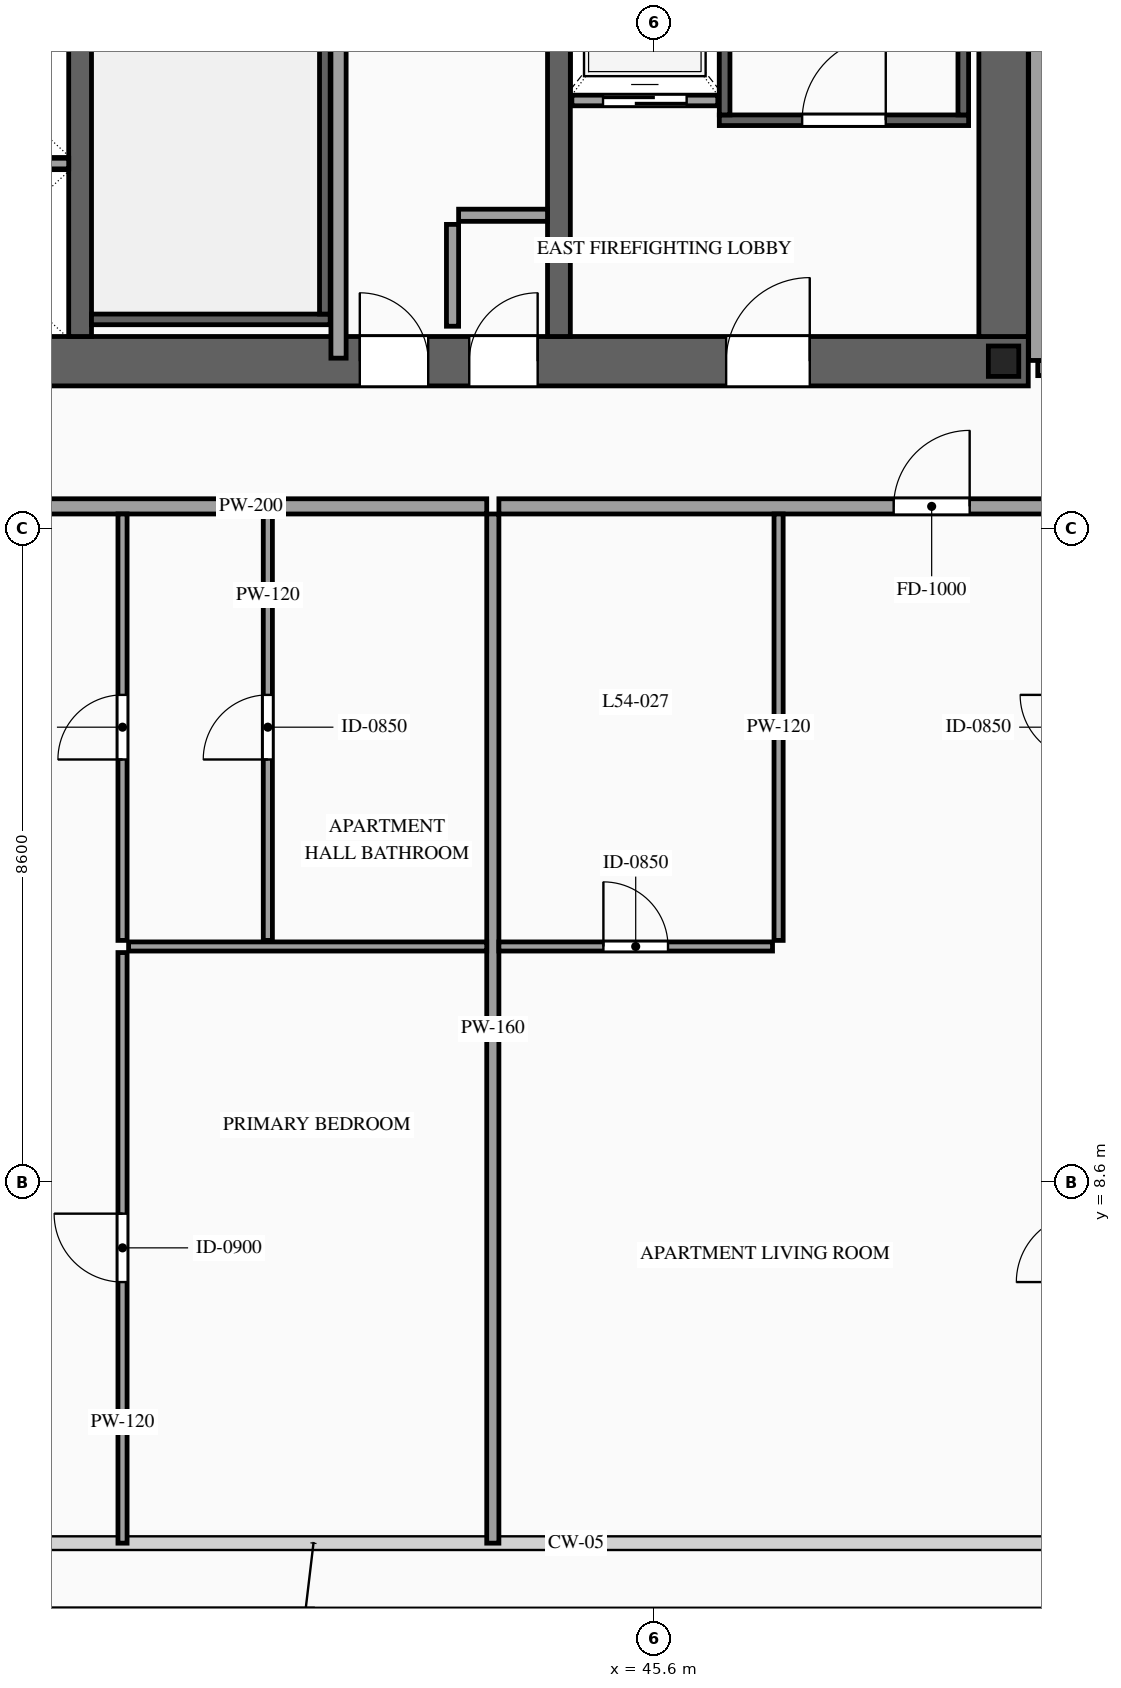
"""IFC4 building model, lengths in metres.
Left out: names, types, materials, properties, quantities, classifications, styles, units other than length and angle.
Written with IfcOpenShell. Run it as: python <this file> out.ifc"""

import sys

from ifc_helpers import new_model, si_unit, direction, frame, frame_2d, origin, origin_2d, place, context, subcontext, project, spatial, rectangle, i_section, extrude, source, transform, mapped, element, fill, save


model = new_model("IFC4")
c1 = context("Model", 3, precision=1e-05, world=origin(), true_north=direction((0.0, 1.0)))
c2 = subcontext(c1, "Body", "Model", "MODEL_VIEW")
j1 = project(units=[si_unit("LENGTHUNIT", "METRE"), si_unit("PLANEANGLEUNIT", "RADIAN")], contexts=[c1])
p1 = place(None, origin())
s1 = spatial("IfcSite", under=j1, at=p1, CompositionType="ELEMENT")
p2 = place(p1, origin())
s2 = spatial("IfcBuilding", under=s1, at=p2, CompositionType="ELEMENT")
p3 = place(p2, frame((0.0, 0.0, 205.5)))
s3 = spatial("IfcBuildingStorey", under=s2, at=p3, CompositionType="ELEMENT", Elevation=205.5)
p4 = place(p3, frame((23.475, 19.4, 0.0), z_axis=(0.0, 0.0, 1.0), x_axis=(1.0, 0.0, 0.0)))
e1 = element("IfcWall", 1, at=p4, inside=s3, PredefinedType="SHEAR", context=c2, shape_type="SweptSolid", body=[
    extrude(rectangle(XDim=27.05, YDim=0.65, at=frame_2d((13.525, 0.0))), origin(), (0.0, 0.0, 1.0), 3.5),
])
p5 = place(p4, frame((1.975, 0.0, 0.0)))
e2 = element("IfcOpeningElement", 2, at=p5, cuts=e1, PredefinedType="OPENING", context=c2, shape_type="SweptSolid", body=[
    extrude(rectangle(XDim=1.1, YDim=2.2, at=frame_2d((0.55, 1.1))), frame((0.0, 0.34, 0.0), z_axis=(0.0, -1.0, 0.0), x_axis=(1.0, 0.0, 0.0)), (0.0, 0.0, 1.0), 0.68),
])
p6 = place(p4, frame((9.875, 0.0, 0.0)))
e3 = element("IfcOpeningElement", 3, at=p6, cuts=e1, PredefinedType="OPENING", context=c2, shape_type="SweptSolid", body=[
    extrude(rectangle(XDim=1.1, YDim=2.2, at=frame_2d((0.55, 1.1))), frame((0.0, 0.34, 0.0), z_axis=(0.0, -1.0, 0.0), x_axis=(1.0, 0.0, 0.0)), (0.0, 0.0, 1.0), 0.68),
])
p7 = place(p4, frame((23.075, 0.0, 0.0)))
e4 = element("IfcOpeningElement", 4, at=p7, cuts=e1, PredefinedType="OPENING", context=c2, shape_type="SweptSolid", body=[
    extrude(rectangle(XDim=1.1, YDim=2.2, at=frame_2d((0.55, 1.1))), frame((0.0, 0.34, 0.0), z_axis=(0.0, -1.0, 0.0), x_axis=(1.0, 0.0, 0.0)), (0.0, 0.0, 1.0), 0.68),
])
p8 = place(p4, frame((19.695, 0.0, 0.0)))
e5 = element("IfcOpeningElement", 5, at=p8, cuts=e1, PredefinedType="OPENING", context=c2, shape_type="SweptSolid", body=[
    extrude(rectangle(XDim=0.9, YDim=2.15, at=frame_2d((0.45, 1.075))), frame((0.0, 0.34, 0.0), z_axis=(0.0, -1.0, 0.0), x_axis=(1.0, 0.0, 0.0)), (0.0, 0.0, 1.0), 0.68),
])
p9 = place(p4, frame((18.255, 0.0, 0.0)))
e6 = element("IfcOpeningElement", 6, at=p9, cuts=e1, PredefinedType="OPENING", context=c2, shape_type="SweptSolid", body=[
    extrude(rectangle(XDim=0.9, YDim=2.15, at=frame_2d((0.45, 1.075))), frame((0.0, 0.34, 0.0), z_axis=(0.0, -1.0, 0.0), x_axis=(1.0, 0.0, 0.0)), (0.0, 0.0, 1.0), 0.68),
])
m1 = source(origin(), c2, "Body", "SweptSolid", [
    extrude(rectangle(XDim=12.15, YDim=0.65, at=frame_2d((6.075, 0.0))), origin(), (0.0, 0.0, 1.0), 3.5),
])
p10 = place(p3, frame((50.2, 19.725, 0.0), z_axis=(0.0, 0.0, 1.0), x_axis=(0.0, 1.0, 0.0)))
e7 = element("IfcWall", 7, at=p10, inside=s3, PredefinedType="SHEAR", context=c2, shape_type="MappedRepresentation", body=[
    mapped(m1, transform((0.0, 0.0, 0.0), scale=1.0)),
])
m2 = source(origin(), c2, "Body", "SweptSolid", [
    extrude(rectangle(XDim=12.15, YDim=0.3, at=frame_2d((6.075, 0.0))), origin(), (0.0, 0.0, 1.0), 3.5),
])
for number, where, z_axis, x_axis in (
    (8, (38.05, 19.725, 0.0), (0.0, 0.0, 1.0), (0.0, 1.0, 0.0)),
    (9, (44.35, 19.725, 0.0), (0.0, 0.0, 1.0), (0.0, 1.0, 0.0)),
):
    element("IfcWall", number, at=place(p3, frame(where, z_axis=z_axis, x_axis=x_axis)), inside=s3, PredefinedType="SOLIDWALL", context=c2, shape_type="MappedRepresentation", body=[
        mapped(m2, transform((0.0, 0.0, 0.0), scale=1.0)),
    ])
m3 = source(origin(), c2, "Body", "SweptSolid", [
    extrude(i_section(OverallWidth=0.4, OverallDepth=0.4, WebThickness=0.013, FlangeThickness=0.021, at=origin_2d()), origin(), (0.0, 0.0, 1.0), 3.5),
])
p11 = place(p3, frame((50.2, 19.4, 0.0), z_axis=(0.0, 0.0, 1.0), x_axis=(1.0, 0.0, 0.0)))
e10 = element("IfcColumn", 10, at=p11, inside=s3, PredefinedType="COLUMN", context=c2, shape_type="MappedRepresentation", body=[
    mapped(m3, transform((0.0, 0.0, 0.0), scale=1.0)),
])
p12 = place(p3, frame((44.52, 22.83, 0.0), z_axis=(0.0, 0.0, 1.0), x_axis=(1.0, 0.0, 0.0)))
e11 = element("IfcWall", 11, at=p12, inside=s3, PredefinedType="SOLIDWALL", context=c2, shape_type="SweptSolid", body=[
    extrude(rectangle(XDim=1.92, YDim=0.14, at=frame_2d((0.96, 0.0))), origin(), (0.0, 0.0, 1.0), 3.28),
])
p13 = place(p12, frame((0.41, 0.0, 0.0)))
e12 = element("IfcOpeningElement", 12, at=p13, cuts=e11, PredefinedType="OPENING", context=c2, shape_type="SweptSolid", body=[
    extrude(rectangle(XDim=1.1, YDim=2.2, at=frame_2d((0.55, 1.1))), frame((0.0, 0.085, 0.0), z_axis=(0.0, -1.0, 0.0), x_axis=(1.0, 0.0, 0.0)), (0.0, 0.0, 1.0), 0.17),
])
m4 = source(origin(), c2, "Body", "SweptSolid", [
    extrude(rectangle(XDim=2.4, YDim=0.14, at=frame_2d((1.2, 0.0))), origin(), (0.0, 0.0, 1.0), 3.28),
])
p14 = place(p3, frame((35.5, 22.0, 0.0), z_axis=(0.0, 0.0, 1.0), x_axis=(1.0, 0.0, 0.0)))
e13 = element("IfcWall", 13, at=p14, inside=s3, PredefinedType="SOLIDWALL", context=c2, shape_type="MappedRepresentation", body=[
    mapped(m4, transform((0.0, 0.0, 0.0), scale=1.0)),
])
p15 = place(p3, frame((46.46, 22.57, 0.0), z_axis=(0.0, 0.0, 1.0), x_axis=(1.0, 0.0, 0.0)))
e14 = element("IfcWall", 14, at=p15, inside=s3, PredefinedType="SOLIDWALL", context=c2, shape_type="SweptSolid", body=[
    extrude(rectangle(XDim=3.28, YDim=0.14, at=frame_2d((1.64, 0.0))), origin(), (0.0, 0.0, 1.0), 3.28),
])
p16 = place(p15, frame((1.09, 0.0, 0.0)))
e15 = element("IfcOpeningElement", 15, at=p16, cuts=e14, PredefinedType="OPENING", context=c2, shape_type="SweptSolid", body=[
    extrude(rectangle(XDim=1.1, YDim=2.2, at=frame_2d((0.55, 1.1))), frame((0.0, 0.085, 0.0), z_axis=(0.0, -1.0, 0.0), x_axis=(1.0, 0.0, 0.0)), (0.0, 0.0, 1.0), 0.17),
])
m5 = source(origin(), c2, "Body", "SweptSolid", [
    extrude(rectangle(XDim=8.94, YDim=0.14, at=frame_2d((4.47, 0.0))), origin(), (0.0, 0.0, 1.0), 3.28),
])
for number, where, z_axis, x_axis in (
    (16, (46.53, 22.64, 0.0), (0.0, 0.0, 1.0), (0.0, 1.0, 0.0)),
    (17, (49.67, 22.64, 0.0), (0.0, 0.0, 1.0), (0.0, 1.0, 0.0)),
):
    element("IfcWall", number, at=place(p3, frame(where, z_axis=z_axis, x_axis=x_axis)), inside=s3, PredefinedType="SOLIDWALL", context=c2, shape_type="MappedRepresentation", body=[
        mapped(m5, transform((0.0, 0.0, 0.0), scale=1.0)),
    ])
m6 = source(origin(), c2, "Body", "SweptSolid", [
    extrude(rectangle(XDim=3.14, YDim=0.14, at=frame_2d((1.57, 0.0))), origin(), (0.0, 0.0, 1.0), 3.28),
])
p17 = place(p3, frame((38.2, 19.95, 0.0), z_axis=(0.0, 0.0, 1.0), x_axis=(1.0, 0.0, 0.0)))
e18 = element("IfcWall", 18, at=p17, inside=s3, PredefinedType="SOLIDWALL", context=c2, shape_type="MappedRepresentation", body=[
    mapped(m6, transform((0.0, 0.0, 0.0), scale=1.0)),
])
m7 = source(origin(), c2, "Body", "SweptSolid", [
    extrude(rectangle(XDim=8.94, YDim=0.14, at=frame_2d((4.47, 0.0))), origin(), (0.0, 0.0, 1.0), 3.28),
])
p18 = place(p3, frame((41.27, 20.02, 0.0), z_axis=(0.0, 0.0, 1.0), x_axis=(0.0, 1.0, 0.0)))
e19 = element("IfcWall", 19, at=p18, inside=s3, PredefinedType="SOLIDWALL", context=c2, shape_type="MappedRepresentation", body=[
    mapped(m7, transform((0.0, 0.0, 0.0), scale=1.0)),
])
m8 = source(origin(), c2, "Body", "SweptSolid", [
    extrude(rectangle(XDim=1.34, YDim=0.16, at=frame_2d((0.67, 0.0))), origin(), (0.0, 0.0, 1.0), 3.28),
])
p19 = place(p3, frame((42.95, 19.86, 0.0), z_axis=(0.0, 0.0, 1.0), x_axis=(0.0, 1.0, 0.0)))
e20 = element("IfcWall", 20, at=p19, inside=s3, PredefinedType="PARTITIONING", context=c2, shape_type="MappedRepresentation", body=[
    mapped(m8, transform((0.0, 0.0, 0.0), scale=1.0)),
])
m9 = source(origin(), c2, "Body", "SweptSolid", [
    extrude(rectangle(XDim=1.17, YDim=0.16, at=frame_2d((0.585, 0.0))), origin(), (0.0, 0.0, 1.0), 3.28),
])
p20 = place(p3, frame((43.03, 21.32, 0.0), z_axis=(0.0, 0.0, 1.0), x_axis=(1.0, 0.0, 0.0)))
e21 = element("IfcWall", 21, at=p20, inside=s3, PredefinedType="PARTITIONING", context=c2, shape_type="MappedRepresentation", body=[
    mapped(m9, transform((0.0, 0.0, 0.0), scale=1.0)),
])
m10 = source(origin(), c2, "Body", "SweptSolid", [
    extrude(rectangle(XDim=12.72, YDim=0.2, at=frame_2d((6.36, 0.0))), origin(), (0.0, 0.0, 1.0), 3.28),
])
p21 = place(p3, frame((41.45, 19.44, 0.0), z_axis=(0.0, 0.0, 1.0), x_axis=(0.0, 1.0, 0.0)))
e22 = element("IfcWall", 22, at=p21, inside=s3, PredefinedType="PARTITIONING", context=c2, shape_type="MappedRepresentation", body=[
    mapped(m10, transform((0.0, 0.0, 0.0), scale=1.0)),
])
p22 = place(p3, frame((30.6, 17.49, 0.0), z_axis=(0.0, 0.0, 1.0), x_axis=(1.0, 0.0, 0.0)))
e23 = element("IfcWall", 23, at=p22, inside=s3, PredefinedType="PARTITIONING", context=c2, shape_type="SweptSolid", body=[
    extrude(rectangle(XDim=12.8, YDim=0.2, at=frame_2d((6.4, 0.0))), origin(), (0.0, 0.0, 1.0), 3.28),
])
p23 = place(p22, frame((5.344, 0.0, 0.0)))
e24 = element("IfcOpeningElement", 24, at=p23, cuts=e23, PredefinedType="OPENING", context=c2, shape_type="SweptSolid", body=[
    extrude(rectangle(XDim=1.0, YDim=2.2, at=frame_2d((0.5, 1.1))), frame((0.0, 0.115, 0.0), z_axis=(0.0, -1.0, 0.0), x_axis=(1.0, 0.0, 0.0)), (0.0, 0.0, 1.0), 0.23),
])
m11 = source(origin(), c2, "Body", "SweptSolid", [
    extrude(rectangle(XDim=13.54, YDim=0.16, at=frame_2d((6.77, 0.0))), origin(), (0.0, 0.0, 1.0), 3.28),
])
p24 = place(p3, frame((43.48, 3.85, 0.0), z_axis=(0.0, 0.0, 1.0), x_axis=(0.0, 1.0, 0.0)))
e25 = element("IfcWall", 25, at=p24, inside=s3, PredefinedType="PARTITIONING", context=c2, shape_type="MappedRepresentation", body=[
    mapped(m11, transform((0.0, 0.0, 0.0), scale=1.0)),
])
p25 = place(p3, frame((40.52, 11.78, 0.0), z_axis=(0.0, 0.0, 1.0), x_axis=(0.0, 1.0, 0.0)))
e26 = element("IfcWall", 26, at=p25, inside=s3, PredefinedType="PARTITIONING", context=c2, shape_type="SweptSolid", body=[
    extrude(rectangle(XDim=5.61, YDim=0.12, at=frame_2d((2.805, 0.0))), origin(), (0.0, 0.0, 1.0), 3.28),
])
p26 = place(p25, frame((2.38, 0.0, 0.0)))
e27 = element("IfcOpeningElement", 27, at=p26, cuts=e26, PredefinedType="OPENING", context=c2, shape_type="SweptSolid", body=[
    extrude(rectangle(XDim=0.85, YDim=2.1, at=frame_2d((0.425, 1.05))), frame((0.0, 0.075, 0.0), z_axis=(0.0, -1.0, 0.0), x_axis=(1.0, 0.0, 0.0)), (0.0, 0.0, 1.0), 0.15),
])
m12 = source(origin(), c2, "Body", "SweptSolid", [
    extrude(rectangle(XDim=4.712, YDim=0.12, at=frame_2d((2.356, 0.0))), origin(), (0.0, 0.0, 1.0), 2.875),
])
p27 = place(p3, frame((38.688, 11.7, 0.0), z_axis=(0.0, 0.0, 1.0), x_axis=(1.0, 0.0, 0.0)))
e28 = element("IfcWall", 28, at=p27, inside=s3, PredefinedType="PARTITIONING", context=c2, shape_type="MappedRepresentation", body=[
    mapped(m12, transform((0.0, 0.0, 0.0), scale=1.0)),
])
p28 = place(p3, frame((38.608, 3.85, 0.0), z_axis=(0.0, 0.0, 1.0), x_axis=(0.0, 1.0, 0.0)))
e29 = element("IfcWall", 29, at=p28, inside=s3, PredefinedType="PARTITIONING", context=c2, shape_type="SweptSolid", body=[
    extrude(rectangle(XDim=7.77, YDim=0.12, at=frame_2d((3.885, 0.0))), origin(), (0.0, 0.0, 1.0), 3.28),
])
p29 = place(p28, frame((3.435, 0.0, 0.0)))
e30 = element("IfcOpeningElement", 30, at=p29, cuts=e29, PredefinedType="OPENING", context=c2, shape_type="SweptSolid", body=[
    extrude(rectangle(XDim=0.9, YDim=2.15, at=frame_2d((0.45, 1.075))), frame((0.0, 0.075, 0.0), z_axis=(0.0, -1.0, 0.0), x_axis=(1.0, 0.0, 0.0)), (0.0, 0.0, 1.0), 0.15),
])
p30 = place(p3, frame((38.608, 11.78, 0.0), z_axis=(0.0, 0.0, 1.0), x_axis=(0.0, 1.0, 0.0)))
e31 = element("IfcWall", 31, at=p30, inside=s3, PredefinedType="PARTITIONING", context=c2, shape_type="SweptSolid", body=[
    extrude(rectangle(XDim=5.61, YDim=0.12, at=frame_2d((2.805, 0.0))), origin(), (0.0, 0.0, 1.0), 3.28),
])
p31 = place(p30, frame((2.38, 0.0, 0.0)))
e32 = element("IfcOpeningElement", 32, at=p31, cuts=e31, PredefinedType="OPENING", context=c2, shape_type="SweptSolid", body=[
    extrude(rectangle(XDim=0.85, YDim=2.1, at=frame_2d((0.425, 1.05))), frame((0.0, 0.075, 0.0), z_axis=(0.0, -1.0, 0.0), x_axis=(1.0, 0.0, 0.0)), (0.0, 0.0, 1.0), 0.15),
])
p32 = place(p3, frame((43.56, 17.49, 0.0), z_axis=(0.0, 0.0, 1.0), x_axis=(1.0, 0.0, 0.0)))
e33 = element("IfcWall", 33, at=p32, inside=s3, PredefinedType="PARTITIONING", context=c2, shape_type="SweptSolid", body=[
    extrude(rectangle(XDim=12.5, YDim=0.2, at=frame_2d((6.25, 0.0))), origin(), (0.0, 0.0, 1.0), 3.28),
])
p33 = place(p32, frame((5.194, 0.0, 0.0)))
e34 = element("IfcOpeningElement", 34, at=p33, cuts=e33, PredefinedType="OPENING", context=c2, shape_type="SweptSolid", body=[
    extrude(rectangle(XDim=1.0, YDim=2.2, at=frame_2d((0.5, 1.1))), frame((0.0, 0.115, 0.0), z_axis=(0.0, -1.0, 0.0), x_axis=(1.0, 0.0, 0.0)), (0.0, 0.0, 1.0), 0.23),
])
p34 = place(p3, frame((43.56, 11.7, 0.0), z_axis=(0.0, 0.0, 1.0), x_axis=(1.0, 0.0, 0.0)))
e35 = element("IfcWall", 35, at=p34, inside=s3, PredefinedType="PARTITIONING", context=c2, shape_type="SweptSolid", body=[
    extrude(rectangle(XDim=3.6, YDim=0.12, at=frame_2d((1.8, 0.0))), origin(), (0.0, 0.0, 1.0), 2.875),
])
p35 = place(p34, frame((1.375, 0.0, 0.0)))
e36 = element("IfcOpeningElement", 36, at=p35, cuts=e35, PredefinedType="OPENING", context=c2, shape_type="SweptSolid", body=[
    extrude(rectangle(XDim=0.85, YDim=2.1, at=frame_2d((0.425, 1.05))), frame((0.0, 0.075, 0.0), z_axis=(0.0, -1.0, 0.0), x_axis=(1.0, 0.0, 0.0)), (0.0, 0.0, 1.0), 0.15),
])
m13 = source(origin(), c2, "Body", "SweptSolid", [
    extrude(rectangle(XDim=5.61, YDim=0.12, at=frame_2d((2.805, 0.0))), origin(), (0.0, 0.0, 1.0), 3.28),
])
p36 = place(p3, frame((47.24, 11.78, 0.0), z_axis=(0.0, 0.0, 1.0), x_axis=(0.0, 1.0, 0.0)))
e37 = element("IfcWall", 37, at=p36, inside=s3, PredefinedType="PARTITIONING", context=c2, shape_type="MappedRepresentation", body=[
    mapped(m13, transform((0.0, 0.0, 0.0), scale=1.0)),
])
p37 = place(p3, frame((50.65, 19.31, 0.0), z_axis=(0.0, 0.0, 1.0), x_axis=(1.0, 0.0, 0.0)))
e38 = element("IfcWall", 38, at=p37, inside=s3, PredefinedType="PARTITIONING", context=c2, shape_type="SweptSolid", body=[
    extrude(rectangle(XDim=8.3, YDim=0.2, at=frame_2d((4.15, 0.0))), origin(), (0.0, 0.0, 1.0), 2.775),
])
p38 = place(p37, frame((3.585, 0.0, 0.0)))
e39 = element("IfcOpeningElement", 39, at=p38, cuts=e38, PredefinedType="OPENING", context=c2, shape_type="SweptSolid", body=[
    extrude(rectangle(XDim=1.0, YDim=2.2, at=frame_2d((0.5, 1.1))), frame((0.0, 0.115, 0.0), z_axis=(0.0, -1.0, 0.0), x_axis=(1.0, 0.0, 0.0)), (0.0, 0.0, 1.0), 0.23),
])
m14 = source(origin(), c2, "Body", "SweptSolid", [
    extrude(rectangle(XDim=6.29, YDim=0.2, at=frame_2d((3.145, 0.0))), origin(), (0.0, 0.0, 1.0), 3.28),
])
p39 = place(p3, frame((50.63, 19.41, 0.0), z_axis=(0.0, 0.0, 1.0), x_axis=(0.0, 1.0, 0.0)))
e40 = element("IfcWall", 40, at=p39, inside=s3, PredefinedType="PARTITIONING", context=c2, shape_type="MappedRepresentation", body=[
    mapped(m14, transform((0.0, 0.0, 0.0), scale=1.0)),
])
m15 = source(origin(), c2, "Body", "SweptSolid", [
    extrude(rectangle(XDim=1.1, YDim=2.2, at=frame_2d((0.55, 1.1))), frame((0.0, 0.025, 0.0), z_axis=(0.0, -1.0, 0.0), x_axis=(1.0, 0.0, 0.0)), (0.0, 0.0, 1.0), 0.05),
])
p40 = place(p13, origin())
e41 = element("IfcDoor", 41, at=p40, inside=s3, OperationType="SLIDING_TO_RIGHT", PredefinedType="DOOR", context=c2, shape_type="MappedRepresentation", body=[
    mapped(m15, transform((0.0, 0.0, 0.0), scale=1.0)),
])
fill(e12, e41)
m16 = source(origin(), c2, "Body", "SweptSolid", [
    extrude(rectangle(XDim=1.1, YDim=2.2, at=frame_2d((0.55, 1.1))), frame((0.0, 0.025, 0.0), z_axis=(0.0, -1.0, 0.0), x_axis=(1.0, 0.0, 0.0)), (0.0, 0.0, 1.0), 0.05),
])
p41 = place(p16, origin())
e42 = element("IfcDoor", 42, at=p41, inside=s3, OperationType="SINGLE_SWING_RIGHT", PredefinedType="DOOR", context=c2, shape_type="MappedRepresentation", body=[
    mapped(m16, transform((0.0, 0.0, 0.0), scale=1.0)),
])
fill(e15, e42)
p42 = place(p7, origin())
e43 = element("IfcDoor", 43, at=p42, inside=s3, OperationType="SINGLE_SWING_RIGHT", PredefinedType="DOOR", context=c2, shape_type="MappedRepresentation", body=[
    mapped(m16, transform((0.0, 0.0, 0.0), scale=1.0)),
])
fill(e4, e43)
m17 = source(origin(), c2, "Body", "SweptSolid", [
    extrude(rectangle(XDim=0.9, YDim=2.15, at=frame_2d((0.45, 1.075))), frame((0.0, 0.025, 0.0), z_axis=(0.0, -1.0, 0.0), x_axis=(1.0, 0.0, 0.0)), (0.0, 0.0, 1.0), 0.05),
])
p43 = place(p8, origin())
e44 = element("IfcDoor", 44, at=p43, inside=s3, OperationType="SINGLE_SWING_RIGHT", PredefinedType="DOOR", context=c2, shape_type="MappedRepresentation", body=[
    mapped(m17, transform((0.0, 0.0, 0.0), scale=1.0)),
])
fill(e5, e44)
p44 = place(p9, origin())
e45 = element("IfcDoor", 45, at=p44, inside=s3, OperationType="SINGLE_SWING_LEFT", PredefinedType="DOOR", context=c2, shape_type="MappedRepresentation", body=[
    mapped(m17, transform((0.0, 0.0, 0.0), scale=1.0)),
])
fill(e6, e45)
m18 = source(origin(), c2, "Body", "SweptSolid", [
    extrude(rectangle(XDim=0.85, YDim=2.1, at=frame_2d((0.425, 1.05))), frame((0.0, 0.025, 0.0), z_axis=(0.0, -1.0, 0.0), x_axis=(1.0, 0.0, 0.0)), (0.0, 0.0, 1.0), 0.05),
])
p45 = place(p26, origin())
e46 = element("IfcDoor", 46, at=p45, inside=s3, OperationType="SINGLE_SWING_LEFT", PredefinedType="DOOR", context=c2, shape_type="MappedRepresentation", body=[
    mapped(m18, transform((0.0, 0.0, 0.0), scale=1.0)),
])
fill(e27, e46)
m19 = source(origin(), c2, "Body", "SweptSolid", [
    extrude(rectangle(XDim=0.9, YDim=2.15, at=frame_2d((0.45, 1.075))), frame((0.0, 0.025, 0.0), z_axis=(0.0, -1.0, 0.0), x_axis=(1.0, 0.0, 0.0)), (0.0, 0.0, 1.0), 0.05),
])
p46 = place(p29, origin())
e47 = element("IfcDoor", 47, at=p46, inside=s3, OperationType="SINGLE_SWING_RIGHT", PredefinedType="DOOR", context=c2, shape_type="MappedRepresentation", body=[
    mapped(m19, transform((0.0, 0.0, 0.0), scale=1.0)),
])
fill(e30, e47)
p47 = place(p31, origin())
e48 = element("IfcDoor", 48, at=p47, inside=s3, OperationType="SINGLE_SWING_LEFT", PredefinedType="DOOR", context=c2, shape_type="MappedRepresentation", body=[
    mapped(m18, transform((0.0, 0.0, 0.0), scale=1.0)),
])
fill(e32, e48)
m20 = source(origin(), c2, "Body", "SweptSolid", [
    extrude(rectangle(XDim=1.0, YDim=2.2, at=frame_2d((0.5, 1.1))), frame((0.0, 0.025, 0.0), z_axis=(0.0, -1.0, 0.0), x_axis=(1.0, 0.0, 0.0)), (0.0, 0.0, 1.0), 0.05),
])
p48 = place(p33, origin())
e49 = element("IfcDoor", 49, at=p48, inside=s3, OperationType="SINGLE_SWING_RIGHT", PredefinedType="DOOR", context=c2, shape_type="MappedRepresentation", body=[
    mapped(m20, transform((0.0, 0.0, 0.0), scale=1.0)),
])
fill(e34, e49)
p49 = place(p35, origin())
e50 = element("IfcDoor", 50, at=p49, inside=s3, OperationType="SINGLE_SWING_LEFT", PredefinedType="DOOR", context=c2, shape_type="MappedRepresentation", body=[
    mapped(m18, transform((0.0, 0.0, 0.0), scale=1.0)),
])
fill(e36, e50)
save(model, sys.argv[1])
